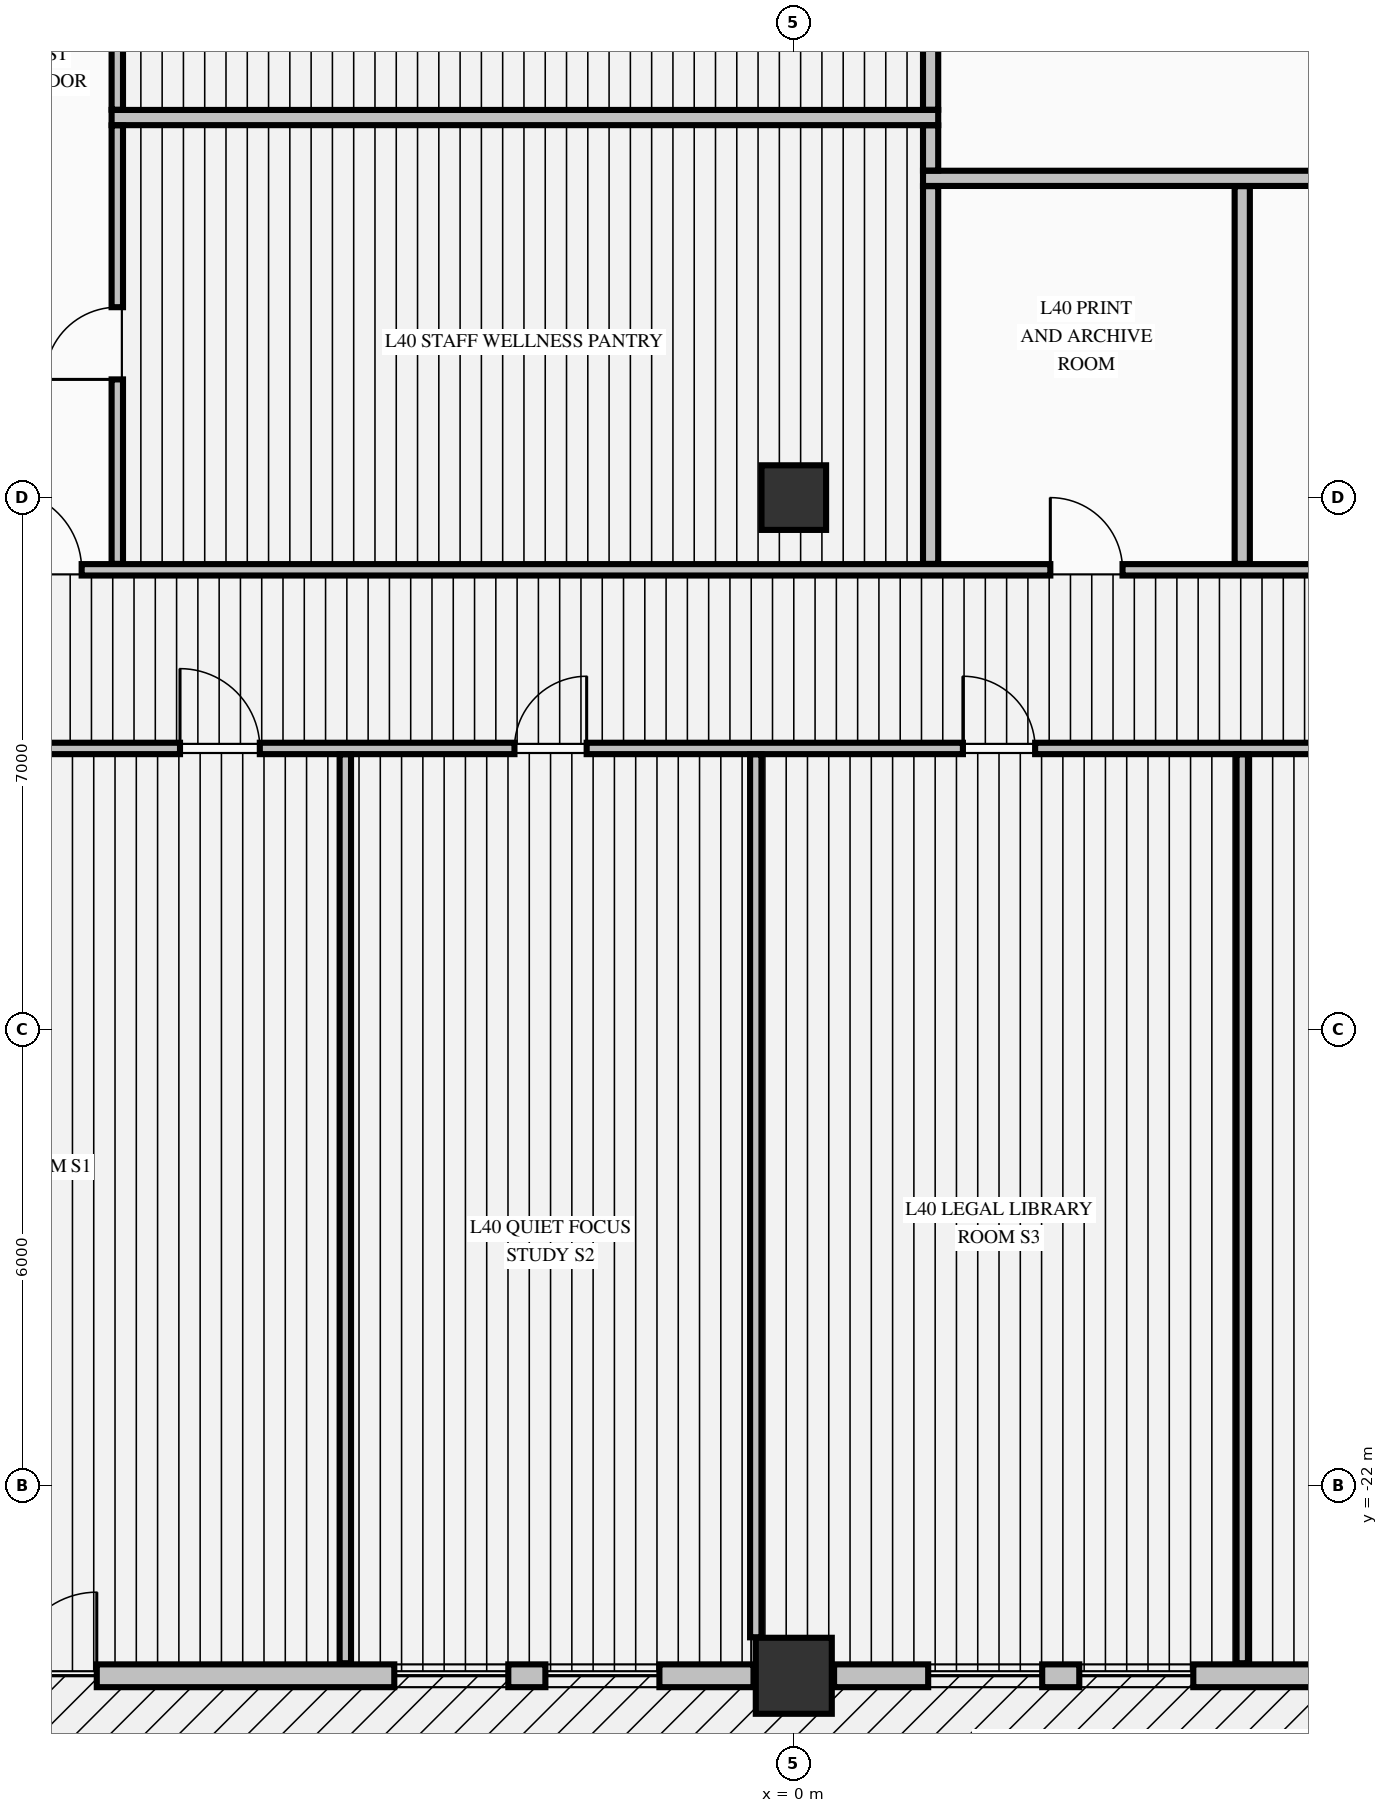
"""IFC4 building model, lengths in metres.
Left out: names, types, materials, properties, quantities, classifications, styles, units other than length and angle.
Written with IfcOpenShell. Run it as: python <this file> out.ifc"""

import sys

from ifc_helpers import new_model, si_unit, direction, frame, frame_2d, origin, origin_2d, place, context, subcontext, project, spatial, rectangle, extrude, element, fill, save


model = new_model("IFC4")
c1 = context("Model", 3, precision=1e-05, world=origin(), true_north=direction((0.0, 1.0)))
c2 = subcontext(c1, "Body", "Model", "MODEL_VIEW")
j1 = project(units=[si_unit("LENGTHUNIT", "METRE"), si_unit("PLANEANGLEUNIT", "RADIAN")], contexts=[c1])
p1 = place(None, origin())
s1 = spatial("IfcSite", under=j1, at=p1, CompositionType="ELEMENT")
p2 = place(p1, origin())
s2 = spatial("IfcBuilding", under=s1, at=p2, CompositionType="ELEMENT")
p3 = place(p2, frame((0.0, 0.0, 158.24)))
s3 = spatial("IfcBuildingStorey", under=s2, at=p3, CompositionType="ELEMENT", Elevation=158.24)
p4 = place(p3, frame((0.0, -24.5, -0.425), z_axis=(0.0, 0.0, 1.0), x_axis=(1.0, 0.0, 0.0)))
e1 = element("IfcColumn", 1, at=p4, inside=s3, PredefinedType="COLUMN", context=c2, shape_type="SweptSolid", body=[
    extrude(rectangle(XDim=1.0, YDim=1.0, at=origin_2d()), origin(), (0.0, 0.0, 1.0), 4.595),
])
p5 = place(p3, frame((0.0, -9.0, -0.425), z_axis=(0.0, 0.0, 1.0), x_axis=(1.0, 0.0, 0.0)))
e2 = element("IfcColumn", 2, at=p5, inside=s3, PredefinedType="COLUMN", context=c2, shape_type="SweptSolid", body=[
    extrude(rectangle(XDim=0.85, YDim=0.85, at=origin_2d()), origin(), (0.0, 0.0, 1.0), 4.595),
])
p6 = place(p3, frame((-10.47, -24.5, 0.0), z_axis=(0.0, 0.0, 1.0), x_axis=(1.0, 0.0, 0.0)))
e3 = element("IfcWall", 3, at=p6, inside=s3, PredefinedType="STANDARD", context=c2, shape_type="SweptSolid", body=[
    extrude(rectangle(XDim=9.94, YDim=0.3, at=frame_2d((4.97, 0.0))), origin(), (0.0, 0.0, 1.0), 3.562),
])
p7 = place(p6, frame((0.2, 0.0, 0.0)))
e4 = element("IfcOpeningElement", 4, at=p7, cuts=e3, PredefinedType="OPENING", context=c2, shape_type="SweptSolid", body=[
    extrude(rectangle(XDim=1.1, YDim=2.15, at=frame_2d((0.55, 1.075))), frame((0.0, 0.16, 0.0), z_axis=(0.0, -1.0, 0.0), x_axis=(1.0, 0.0, 0.0)), (0.0, 0.0, 1.0), 0.32),
])
p8 = place(p6, frame((5.214, 0.0, 0.72)))
e5 = element("IfcOpeningElement", 5, at=p8, cuts=e3, PredefinedType="OPENING", context=c2, shape_type="SweptSolid", body=[
    extrude(rectangle(XDim=1.5, YDim=1.6, at=frame_2d((0.75, 0.8))), frame((0.0, 0.16, 0.0), z_axis=(0.0, -1.0, 0.0), x_axis=(1.0, 0.0, 0.0)), (0.0, 0.0, 1.0), 0.32),
])
p9 = place(p6, frame((7.202, 0.0, 0.72)))
e6 = element("IfcOpeningElement", 6, at=p9, cuts=e3, PredefinedType="OPENING", context=c2, shape_type="SweptSolid", body=[
    extrude(rectangle(XDim=1.5, YDim=1.6, at=frame_2d((0.75, 0.8))), frame((0.0, 0.16, 0.0), z_axis=(0.0, -1.0, 0.0), x_axis=(1.0, 0.0, 0.0)), (0.0, 0.0, 1.0), 0.32),
])
p10 = place(p3, frame((0.53, -24.5, 0.0), z_axis=(0.0, 0.0, 1.0), x_axis=(1.0, 0.0, 0.0)))
e7 = element("IfcWall", 7, at=p10, inside=s3, PredefinedType="STANDARD", context=c2, shape_type="SweptSolid", body=[
    extrude(rectangle(XDim=9.94, YDim=0.3, at=frame_2d((4.97, 0.0))), origin(), (0.0, 0.0, 1.0), 3.562),
])
p11 = place(p10, frame((1.238, 0.0, 0.72)))
e8 = element("IfcOpeningElement", 8, at=p11, cuts=e7, PredefinedType="OPENING", context=c2, shape_type="SweptSolid", body=[
    extrude(rectangle(XDim=1.5, YDim=1.6, at=frame_2d((0.75, 0.8))), frame((0.0, 0.16, 0.0), z_axis=(0.0, -1.0, 0.0), x_axis=(1.0, 0.0, 0.0)), (0.0, 0.0, 1.0), 0.32),
])
p12 = place(p10, frame((3.226, 0.0, 0.72)))
e9 = element("IfcOpeningElement", 9, at=p12, cuts=e7, PredefinedType="OPENING", context=c2, shape_type="SweptSolid", body=[
    extrude(rectangle(XDim=1.5, YDim=1.6, at=frame_2d((0.75, 0.8))), frame((0.0, 0.16, 0.0), z_axis=(0.0, -1.0, 0.0), x_axis=(1.0, 0.0, 0.0)), (0.0, 0.0, 1.0), 0.32),
])
p13 = place(p10, frame((7.202, 0.0, 0.72)))
e10 = element("IfcOpeningElement", 10, at=p13, cuts=e7, PredefinedType="OPENING", context=c2, shape_type="SweptSolid", body=[
    extrude(rectangle(XDim=1.5, YDim=1.6, at=frame_2d((0.75, 0.8))), frame((0.0, 0.16, 0.0), z_axis=(0.0, -1.0, 0.0), x_axis=(1.0, 0.0, 0.0)), (0.0, 0.0, 1.0), 0.32),
])
p14 = place(p3, frame((-20.075, -12.3, 0.0), z_axis=(0.0, 0.0, 1.0), x_axis=(1.0, 0.0, 0.0)))
e11 = element("IfcWall", 11, at=p14, inside=s3, PredefinedType="PARTITIONING", context=c2, shape_type="SweptSolid", body=[
    extrude(rectangle(XDim=46.91, YDim=0.15, at=frame_2d((23.455, 0.0))), origin(), (0.0, 0.0, 1.0), 4.17),
])
p15 = place(p14, frame((12.0, 0.0, 0.0)))
e12 = element("IfcOpeningElement", 12, at=p15, cuts=e11, PredefinedType="OPENING", context=c2, shape_type="SweptSolid", body=[
    extrude(rectangle(XDim=1.05, YDim=2.15, at=frame_2d((0.525, 1.075))), frame((0.0, 0.085, 0.0), z_axis=(0.0, -1.0, 0.0), x_axis=(1.0, 0.0, 0.0)), (0.0, 0.0, 1.0), 0.17),
])
p16 = place(p14, frame((16.4, 0.0, 0.0)))
e13 = element("IfcOpeningElement", 13, at=p16, cuts=e11, PredefinedType="OPENING", context=c2, shape_type="SweptSolid", body=[
    extrude(rectangle(XDim=0.95, YDim=2.15, at=frame_2d((0.475, 1.075))), frame((0.0, 0.085, 0.0), z_axis=(0.0, -1.0, 0.0), x_axis=(1.0, 0.0, 0.0)), (0.0, 0.0, 1.0), 0.17),
])
p17 = place(p14, frame((22.3, 0.0, 0.0)))
e14 = element("IfcOpeningElement", 14, at=p17, cuts=e11, PredefinedType="OPENING", context=c2, shape_type="SweptSolid", body=[
    extrude(rectangle(XDim=0.95, YDim=2.15, at=frame_2d((0.475, 1.075))), frame((0.0, 0.085, 0.0), z_axis=(0.0, -1.0, 0.0), x_axis=(1.0, 0.0, 0.0)), (0.0, 0.0, 1.0), 0.17),
])
p18 = place(p14, frame((33.0, 0.0, 0.0)))
e15 = element("IfcOpeningElement", 15, at=p18, cuts=e11, PredefinedType="OPENING", context=c2, shape_type="SweptSolid", body=[
    extrude(rectangle(XDim=1.05, YDim=2.15, at=frame_2d((0.525, 1.075))), frame((0.0, 0.085, 0.0), z_axis=(0.0, -1.0, 0.0), x_axis=(1.0, 0.0, 0.0)), (0.0, 0.0, 1.0), 0.17),
])
p19 = place(p14, frame((37.05, 0.0, 0.0)))
e16 = element("IfcOpeningElement", 16, at=p19, cuts=e11, PredefinedType="OPENING", context=c2, shape_type="SweptSolid", body=[
    extrude(rectangle(XDim=0.95, YDim=2.15, at=frame_2d((0.475, 1.075))), frame((0.0, 0.085, 0.0), z_axis=(0.0, -1.0, 0.0), x_axis=(1.0, 0.0, 0.0)), (0.0, 0.0, 1.0), 0.17),
])
p20 = place(p3, frame((-10.569, -9.95, 0.0), z_axis=(0.0, 0.0, 1.0), x_axis=(1.0, 0.0, 0.0)))
e17 = element("IfcWall", 17, at=p20, inside=s3, PredefinedType="PARTITIONING", context=c2, shape_type="SweptSolid", body=[
    extrude(rectangle(XDim=21.138, YDim=0.15, at=frame_2d((10.569, 0.0))), origin(), (0.0, 0.0, 1.0), 4.17),
])
p21 = place(p20, frame((0.15, 0.0, 0.0)))
e18 = element("IfcOpeningElement", 18, at=p21, cuts=e17, PredefinedType="OPENING", context=c2, shape_type="SweptSolid", body=[
    extrude(rectangle(XDim=1.05, YDim=2.15, at=frame_2d((0.525, 1.075))), frame((0.0, 0.085, 0.0), z_axis=(0.0, -1.0, 0.0), x_axis=(1.0, 0.0, 0.0)), (0.0, 0.0, 1.0), 0.17),
])
p22 = place(p20, frame((19.938, 0.0, 0.0)))
e19 = element("IfcOpeningElement", 19, at=p22, cuts=e17, PredefinedType="OPENING", context=c2, shape_type="SweptSolid", body=[
    extrude(rectangle(XDim=1.05, YDim=2.15, at=frame_2d((0.525, 1.075))), frame((0.0, 0.085, 0.0), z_axis=(0.0, -1.0, 0.0), x_axis=(1.0, 0.0, 0.0)), (0.0, 0.0, 1.0), 0.17),
])
p23 = place(p20, frame((13.944, 0.0, 0.0)))
e20 = element("IfcOpeningElement", 20, at=p23, cuts=e17, PredefinedType="OPENING", context=c2, shape_type="SweptSolid", body=[
    extrude(rectangle(XDim=0.95, YDim=2.15, at=frame_2d((0.475, 1.075))), frame((0.0, 0.085, 0.0), z_axis=(0.0, -1.0, 0.0), x_axis=(1.0, 0.0, 0.0)), (0.0, 0.0, 1.0), 0.17),
])
p24 = place(p3, frame((1.7, -4.8, 0.0), z_axis=(0.0, 0.0, 1.0), x_axis=(1.0, 0.0, 0.0)))
e21 = element("IfcWall", 21, at=p24, inside=s3, PredefinedType="PARTITIONING", context=c2, shape_type="SweptSolid", body=[
    extrude(rectangle(XDim=7.275, YDim=0.2, at=frame_2d((3.638, 0.0))), origin(), (0.0, 0.0, 1.0), 4.17),
])
p25 = place(p3, frame((-8.975, -4.0, 0.0), z_axis=(0.0, 0.0, 1.0), x_axis=(1.0, 0.0, 0.0)))
e22 = element("IfcWall", 22, at=p25, inside=s3, PredefinedType="PARTITIONING", context=c2, shape_type="SweptSolid", body=[
    extrude(rectangle(XDim=10.875, YDim=0.2, at=frame_2d((5.438, 0.0))), origin(), (0.0, 0.0, 1.0), 4.17),
])
p26 = place(p3, frame((-8.9, -9.872, 0.0), z_axis=(0.0, 0.0, 1.0), x_axis=(0.0, 1.0, 0.0)))
e23 = element("IfcWall", 23, at=p26, inside=s3, PredefinedType="PARTITIONING", context=c2, shape_type="SweptSolid", body=[
    extrude(rectangle(XDim=5.769, YDim=0.15, at=frame_2d((2.885, 0.0))), origin(), (0.0, 0.0, 1.0), 4.17),
])
p27 = place(p26, frame((2.427, 0.0, 0.0)))
e24 = element("IfcOpeningElement", 24, at=p27, cuts=e23, PredefinedType="OPENING", context=c2, shape_type="SweptSolid", body=[
    extrude(rectangle(XDim=0.95, YDim=2.15, at=frame_2d((0.475, 1.075))), frame((0.0, 0.085, 0.0), z_axis=(0.0, -1.0, 0.0), x_axis=(1.0, 0.0, 0.0)), (0.0, 0.0, 1.0), 0.17),
])
p28 = place(p3, frame((-8.9, -3.897, 0.0), z_axis=(0.0, 0.0, 1.0), x_axis=(0.0, 1.0, 0.0)))
e25 = element("IfcWall", 25, at=p28, inside=s3, PredefinedType="PARTITIONING", context=c2, shape_type="SweptSolid", body=[
    extrude(rectangle(XDim=14.319, YDim=0.15, at=frame_2d((7.16, 0.0))), origin(), (0.0, 0.0, 1.0), 4.17),
])
p29 = place(p28, frame((6.622, 0.0, 0.0)))
e26 = element("IfcOpeningElement", 26, at=p29, cuts=e25, PredefinedType="OPENING", context=c2, shape_type="SweptSolid", body=[
    extrude(rectangle(XDim=1.05, YDim=2.15, at=frame_2d((0.525, 1.075))), frame((0.0, 0.085, 0.0), z_axis=(0.0, -1.0, 0.0), x_axis=(1.0, 0.0, 0.0)), (0.0, 0.0, 1.0), 0.17),
])
p30 = place(p3, frame((-5.9, -24.335, 0.0), z_axis=(0.0, 0.0, 1.0), x_axis=(0.0, 1.0, 0.0)))
e27 = element("IfcWall", 27, at=p30, inside=s3, PredefinedType="PARTITIONING", context=c2, shape_type="SweptSolid", body=[
    extrude(rectangle(XDim=11.957, YDim=0.15, at=frame_2d((5.979, 0.0))), origin(), (0.0, 0.0, 1.0), 4.17),
])
p31 = place(p3, frame((-0.5, -23.994, 0.0), z_axis=(0.0, 0.0, 1.0), x_axis=(0.0, 1.0, 0.0)))
e28 = element("IfcWall", 28, at=p31, inside=s3, PredefinedType="PARTITIONING", context=c2, shape_type="SweptSolid", body=[
    extrude(rectangle(XDim=11.616, YDim=0.15, at=frame_2d((5.808, 0.0))), origin(), (0.0, 0.0, 1.0), 4.17),
])
p32 = place(p3, frame((1.8, -9.872, 0.0), z_axis=(0.0, 0.0, 1.0), x_axis=(0.0, 1.0, 0.0)))
e29 = element("IfcWall", 29, at=p32, inside=s3, PredefinedType="PARTITIONING", context=c2, shape_type="SweptSolid", body=[
    extrude(rectangle(XDim=4.969, YDim=0.2, at=frame_2d((2.484, 0.0))), origin(), (0.0, 0.0, 1.0), 4.17),
])
p33 = place(p3, frame((1.8, -4.697, 0.0), z_axis=(0.0, 0.0, 1.0), x_axis=(0.0, 1.0, 0.0)))
e30 = element("IfcWall", 30, at=p33, inside=s3, PredefinedType="PARTITIONING", context=c2, shape_type="SweptSolid", body=[
    extrude(rectangle(XDim=0.594, YDim=0.2, at=frame_2d((0.297, 0.0))), origin(), (0.0, 0.0, 1.0), 4.17),
])
p34 = place(p3, frame((1.8, -3.897, 0.0), z_axis=(0.0, 0.0, 1.0), x_axis=(0.0, 1.0, 0.0)))
e31 = element("IfcWall", 31, at=p34, inside=s3, PredefinedType="PARTITIONING", context=c2, shape_type="SweptSolid", body=[
    extrude(rectangle(XDim=3.994, YDim=0.2, at=frame_2d((1.997, 0.0))), origin(), (0.0, 0.0, 1.0), 4.17),
])
p35 = place(p3, frame((5.9, -24.335, 0.0), z_axis=(0.0, 0.0, 1.0), x_axis=(0.0, 1.0, 0.0)))
e32 = element("IfcWall", 32, at=p35, inside=s3, PredefinedType="PARTITIONING", context=c2, shape_type="SweptSolid", body=[
    extrude(rectangle(XDim=11.957, YDim=0.15, at=frame_2d((5.979, 0.0))), origin(), (0.0, 0.0, 1.0), 4.17),
])
p36 = place(p3, frame((5.9, -9.872, 0.0), z_axis=(0.0, 0.0, 1.0), x_axis=(0.0, 1.0, 0.0)))
e33 = element("IfcWall", 33, at=p36, inside=s3, PredefinedType="PARTITIONING", context=c2, shape_type="SweptSolid", body=[
    extrude(rectangle(XDim=4.969, YDim=0.2, at=frame_2d((2.484, 0.0))), origin(), (0.0, 0.0, 1.0), 4.17),
])
p37 = place(p7, origin())
e34 = element("IfcDoor", 34, at=p37, inside=s3, OperationType="SINGLE_SWING_RIGHT", PredefinedType="DOOR", context=c2, shape_type="SweptSolid", body=[
    extrude(rectangle(XDim=1.1, YDim=2.15, at=frame_2d((0.55, 1.075))), frame((0.0, 0.025, 0.0), z_axis=(0.0, -1.0, 0.0), x_axis=(1.0, 0.0, 0.0)), (0.0, 0.0, 1.0), 0.05),
])
fill(e4, e34)
p38 = place(p8, origin())
e35 = element("IfcWindow", 35, at=p38, inside=s3, PartitioningType="SINGLE_PANEL", PredefinedType="WINDOW", context=c2, shape_type="SweptSolid", body=[
    extrude(rectangle(XDim=1.5, YDim=1.6, at=frame_2d((0.75, 0.8))), frame((0.0, 0.03, 0.0), z_axis=(0.0, -1.0, 0.0), x_axis=(1.0, 0.0, 0.0)), (0.0, 0.0, 1.0), 0.06),
])
fill(e5, e35)
p39 = place(p9, origin())
e36 = element("IfcWindow", 36, at=p39, inside=s3, PartitioningType="SINGLE_PANEL", PredefinedType="WINDOW", context=c2, shape_type="SweptSolid", body=[
    extrude(rectangle(XDim=1.5, YDim=1.6, at=frame_2d((0.75, 0.8))), frame((0.0, 0.03, 0.0), z_axis=(0.0, -1.0, 0.0), x_axis=(1.0, 0.0, 0.0)), (0.0, 0.0, 1.0), 0.06),
])
fill(e6, e36)
p40 = place(p11, origin())
e37 = element("IfcWindow", 37, at=p40, inside=s3, PartitioningType="SINGLE_PANEL", PredefinedType="WINDOW", context=c2, shape_type="SweptSolid", body=[
    extrude(rectangle(XDim=1.5, YDim=1.6, at=frame_2d((0.75, 0.8))), frame((0.0, 0.03, 0.0), z_axis=(0.0, -1.0, 0.0), x_axis=(1.0, 0.0, 0.0)), (0.0, 0.0, 1.0), 0.06),
])
fill(e8, e37)
p41 = place(p12, origin())
e38 = element("IfcWindow", 38, at=p41, inside=s3, PartitioningType="SINGLE_PANEL", PredefinedType="WINDOW", context=c2, shape_type="SweptSolid", body=[
    extrude(rectangle(XDim=1.5, YDim=1.6, at=frame_2d((0.75, 0.8))), frame((0.0, 0.03, 0.0), z_axis=(0.0, -1.0, 0.0), x_axis=(1.0, 0.0, 0.0)), (0.0, 0.0, 1.0), 0.06),
])
fill(e9, e38)
p42 = place(p21, origin())
e39 = element("IfcDoor", 39, at=p42, inside=s3, OperationType="SINGLE_SWING_LEFT", PredefinedType="DOOR", context=c2, shape_type="SweptSolid", body=[
    extrude(rectangle(XDim=1.05, YDim=2.15, at=frame_2d((0.525, 1.075))), frame((0.0, 0.025, 0.0), z_axis=(0.0, -1.0, 0.0), x_axis=(1.0, 0.0, 0.0)), (0.0, 0.0, 1.0), 0.05),
])
fill(e18, e39)
p43 = place(p15, origin())
e40 = element("IfcDoor", 40, at=p43, inside=s3, OperationType="SINGLE_SWING_LEFT", PredefinedType="DOOR", context=c2, shape_type="SweptSolid", body=[
    extrude(rectangle(XDim=1.05, YDim=2.15, at=frame_2d((0.525, 1.075))), frame((0.0, 0.025, 0.0), z_axis=(0.0, -1.0, 0.0), x_axis=(1.0, 0.0, 0.0)), (0.0, 0.0, 1.0), 0.05),
])
fill(e12, e40)
p44 = place(p16, origin())
e41 = element("IfcDoor", 41, at=p44, inside=s3, OperationType="SINGLE_SWING_RIGHT", PredefinedType="DOOR", context=c2, shape_type="SweptSolid", body=[
    extrude(rectangle(XDim=0.95, YDim=2.15, at=frame_2d((0.475, 1.075))), frame((0.0, 0.025, 0.0), z_axis=(0.0, -1.0, 0.0), x_axis=(1.0, 0.0, 0.0)), (0.0, 0.0, 1.0), 0.05),
])
fill(e13, e41)
p45 = place(p17, origin())
e42 = element("IfcDoor", 42, at=p45, inside=s3, OperationType="SINGLE_SWING_LEFT", PredefinedType="DOOR", context=c2, shape_type="SweptSolid", body=[
    extrude(rectangle(XDim=0.95, YDim=2.15, at=frame_2d((0.475, 1.075))), frame((0.0, 0.025, 0.0), z_axis=(0.0, -1.0, 0.0), x_axis=(1.0, 0.0, 0.0)), (0.0, 0.0, 1.0), 0.05),
])
fill(e14, e42)
p46 = place(p27, origin())
e43 = element("IfcDoor", 43, at=p46, inside=s3, OperationType="SINGLE_SWING_LEFT", PredefinedType="DOOR", context=c2, shape_type="SweptSolid", body=[
    extrude(rectangle(XDim=0.95, YDim=2.15, at=frame_2d((0.475, 1.075))), frame((0.0, 0.025, 0.0), z_axis=(0.0, -1.0, 0.0), x_axis=(1.0, 0.0, 0.0)), (0.0, 0.0, 1.0), 0.05),
])
fill(e24, e43)
p47 = place(p23, origin())
e44 = element("IfcDoor", 44, at=p47, inside=s3, OperationType="SINGLE_SWING_LEFT", PredefinedType="DOOR", context=c2, shape_type="SweptSolid", body=[
    extrude(rectangle(XDim=0.95, YDim=2.15, at=frame_2d((0.475, 1.075))), frame((0.0, 0.025, 0.0), z_axis=(0.0, -1.0, 0.0), x_axis=(1.0, 0.0, 0.0)), (0.0, 0.0, 1.0), 0.05),
])
fill(e20, e44)
save(model, sys.argv[1])
